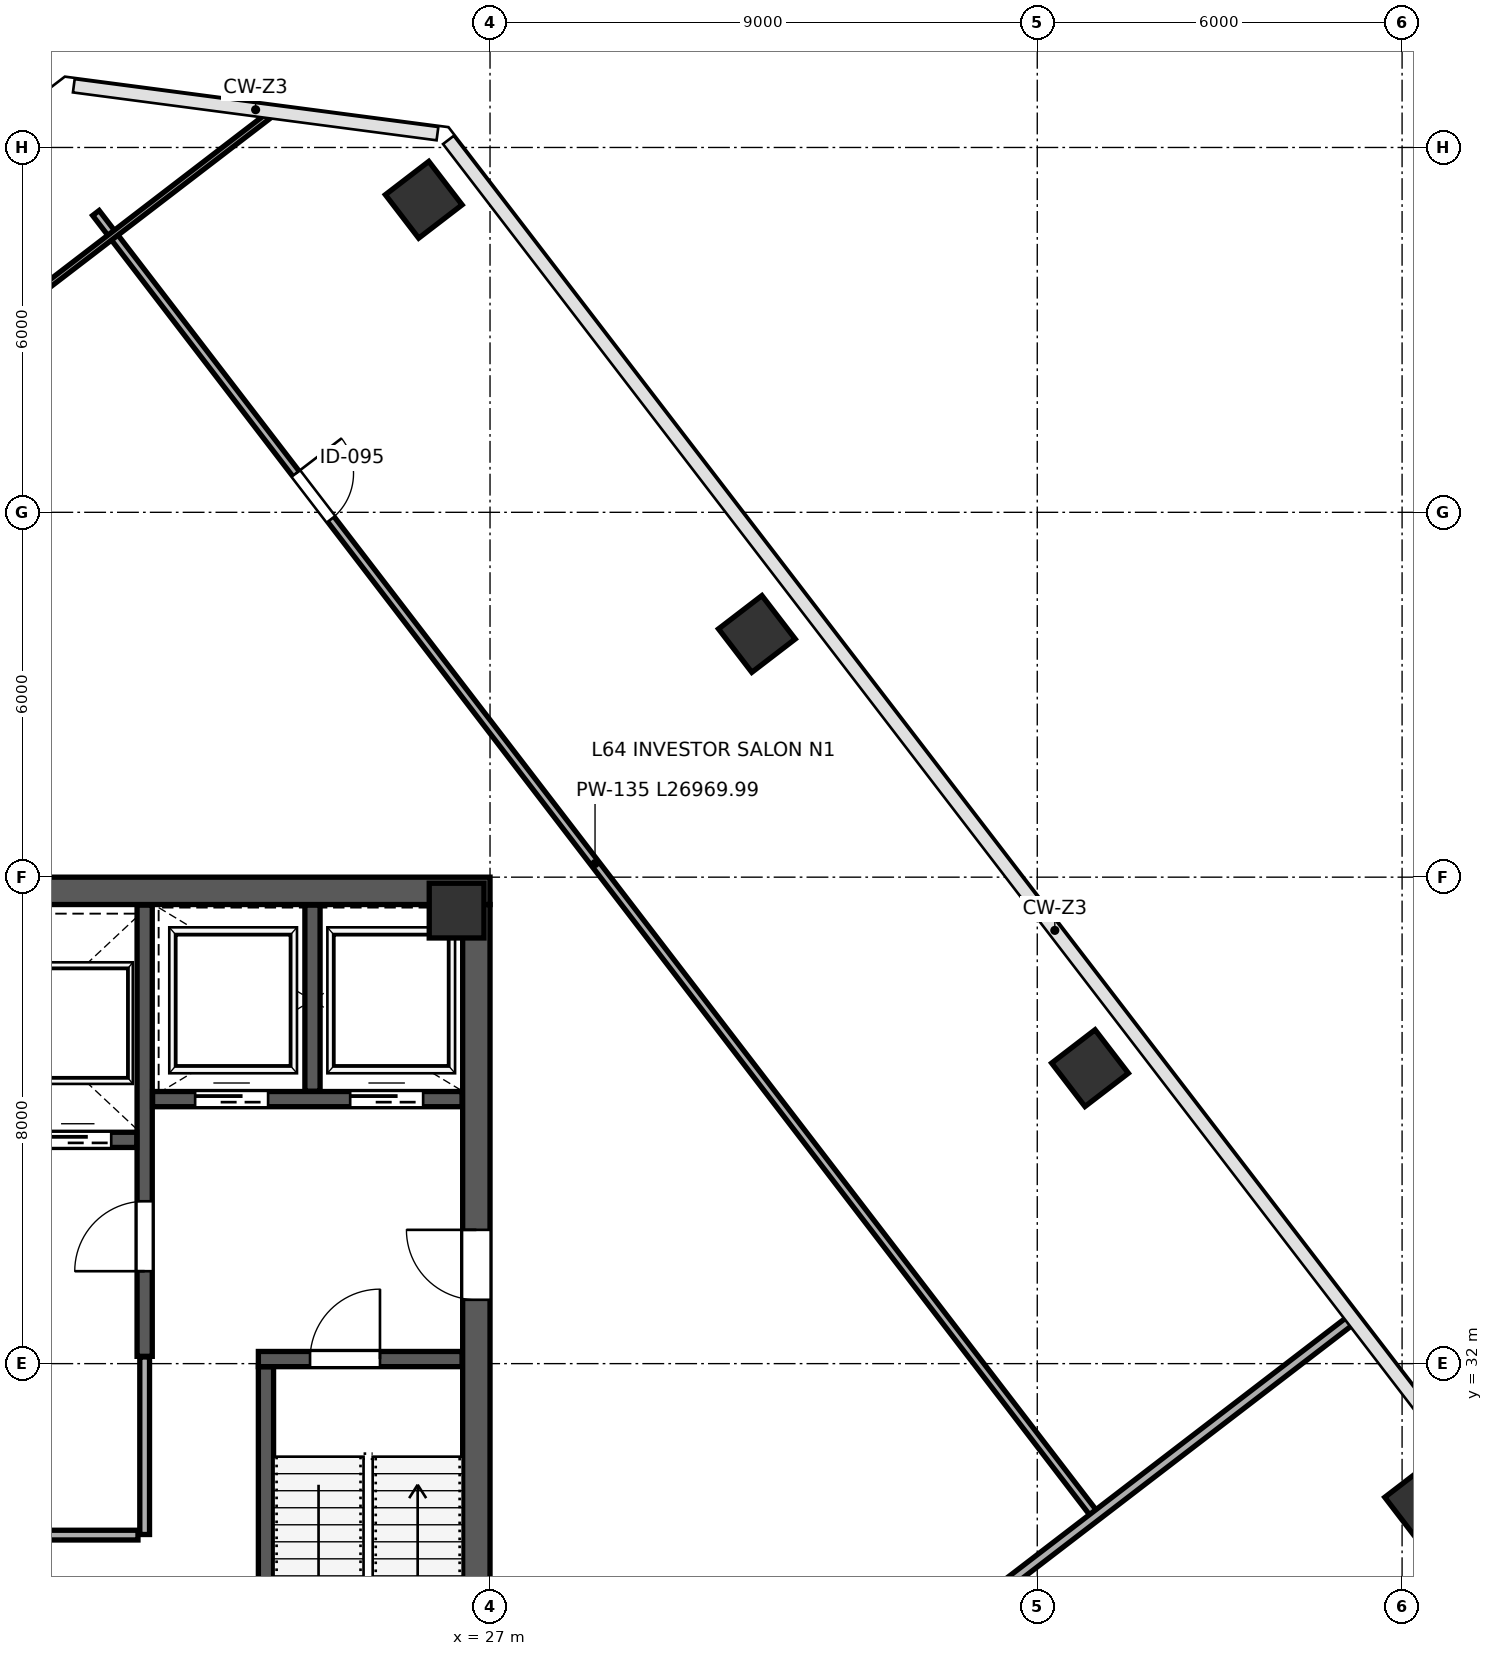
"""IFC4 building model, lengths in metres.
Left out: names, types, materials, properties, quantities, classifications, styles, units other than length and angle.
Written with IfcOpenShell. Run it as: python <this file> out.ifc"""

import sys

from ifc_helpers import new_model, si_unit, direction, frame, frame_2d, origin, origin_2d, place, context, subcontext, project, spatial, rectangle, extrude, source, transform, mapped, element, fill, save


model = new_model("IFC4")
c1 = context("Model", 3, precision=1e-05, world=origin(), true_north=direction((0.0, 1.0)))
c2 = subcontext(c1, "Body", "Model", "MODEL_VIEW")
j1 = project(units=[si_unit("LENGTHUNIT", "METRE"), si_unit("PLANEANGLEUNIT", "RADIAN")], contexts=[c1])
p1 = place(None, origin())
s1 = spatial("IfcSite", under=j1, at=p1, CompositionType="ELEMENT")
p2 = place(p1, origin())
s2 = spatial("IfcBuilding", under=s1, at=p2, CompositionType="ELEMENT")
p3 = place(p2, frame((0.0, 0.0, 283.6)))
s3 = spatial("IfcBuildingStorey", under=s2, at=p3, CompositionType="ELEMENT", Elevation=283.6)
m1 = source(origin(), c2, "Body", "SweptSolid", [
    extrude(rectangle(XDim=0.9, YDim=0.9, at=origin_2d()), origin(), (0.0, 0.0, 1.0), 4.198),
])
p4 = place(p3, frame((26.45, 39.45, 0.001), z_axis=(0.0, 0.0, 1.0), x_axis=(1.0, 0.0, 0.0)))
e1 = element("IfcColumn", 1, at=p4, inside=s3, PredefinedType="COLUMN", context=c2, shape_type="MappedRepresentation", body=[
    mapped(m1, transform((0.0, 0.0, 0.0), scale=1.0)),
])
m2 = source(origin(), c2, "Body", "SweptSolid", [
    extrude(rectangle(XDim=0.9, YDim=0.9, at=origin_2d()), origin(), (0.0, 0.0, 1.0), 4.198),
])
for number, where, z_axis, x_axis in (
    (2, (25.91, 51.14, 0.001), (0.0, 0.0, 1.0), (-0.609, 0.793, 0.0)),
    (3, (31.389, 44.0, 0.001), (0.0, 0.0, 1.0), (-0.609, 0.793, 0.0)),
    (4, (36.867, 36.859, 0.001), (0.0, 0.0, 1.0), (-0.609, 0.793, 0.0)),
    (5, (42.346, 29.719, 0.001), (0.0, 0.0, 1.0), (-0.609, 0.793, 0.0)),
):
    element("IfcColumn", number, at=place(p3, frame(where, z_axis=z_axis, x_axis=x_axis)), inside=s3, PredefinedType="COLUMN", context=c2, shape_type="MappedRepresentation", body=[
        mapped(m2, transform((0.0, 0.0, 0.0), scale=1.0)),
    ])
p5 = place(p3, frame((26.775, 24.45, 0.0), z_axis=(0.0, 0.0, 1.0), x_axis=(0.0, 1.0, 0.0)))
e6 = element("IfcWall", 6, at=p5, inside=s3, PredefinedType="SHEAR", context=c2, shape_type="SweptSolid", body=[
    extrude(rectangle(XDim=15.1, YDim=0.45, at=frame_2d((7.55, 0.0))), origin(), (0.0, 0.0, 1.0), 3.92),
])
p6 = place(p5, frame((8.6, 0.0, 0.0)))
e7 = element("IfcOpeningElement", 7, at=p6, cuts=e6, PredefinedType="OPENING", context=c2, shape_type="SweptSolid", body=[
    extrude(rectangle(XDim=1.15, YDim=2.2, at=frame_2d((0.575, 1.1))), frame((0.0, 0.235, 0.0), z_axis=(0.0, -1.0, 0.0), x_axis=(1.0, 0.0, 0.0)), (0.0, 0.0, 1.0), 0.47),
])
p7 = place(p3, frame((9.0, 39.775, 0.0), z_axis=(0.0, 0.0, 1.0), x_axis=(1.0, 0.0, 0.0)))
e8 = element("IfcWall", 8, at=p7, inside=s3, PredefinedType="SHEAR", context=c2, shape_type="SweptSolid", body=[
    extrude(rectangle(XDim=18.0, YDim=0.45, at=frame_2d((9.0, 0.0))), origin(), (0.0, 0.0, 1.0), 3.92),
])
p8 = place(p3, frame((23.315, 24.46, 0.0), z_axis=(0.0, 0.0, 1.0), x_axis=(0.0, 1.0, 0.0)))
e9 = element("IfcWall", 9, at=p8, inside=s3, PredefinedType="SHEAR", context=c2, shape_type="SweptSolid", body=[
    extrude(rectangle(XDim=7.49, YDim=0.25, at=frame_2d((3.745, 0.0))), origin(), (0.0, 0.0, 1.0), 3.92),
])
p9 = place(p3, frame((23.19, 32.075, 0.0), z_axis=(0.0, 0.0, 1.0), x_axis=(1.0, 0.0, 0.0)))
e10 = element("IfcWall", 10, at=p9, inside=s3, PredefinedType="SHEAR", context=c2, shape_type="SweptSolid", body=[
    extrude(rectangle(XDim=3.35, YDim=0.25, at=frame_2d((1.675, 0.0))), origin(), (0.0, 0.0, 1.0), 3.92),
])
p10 = place(p9, frame((0.85, 0.0, 0.0)))
e11 = element("IfcOpeningElement", 11, at=p10, cuts=e10, PredefinedType="OPENING", context=c2, shape_type="SweptSolid", body=[
    extrude(rectangle(XDim=1.15, YDim=2.2, at=frame_2d((0.575, 1.1))), frame((0.0, 0.135, 0.0), z_axis=(0.0, -1.0, 0.0), x_axis=(1.0, 0.0, 0.0)), (0.0, 0.0, 1.0), 0.27),
])
p11 = place(p3, frame((21.32, 32.12, 0.0), z_axis=(0.0, 0.0, 1.0), x_axis=(0.0, 1.0, 0.0)))
e12 = element("IfcWall", 12, at=p11, inside=s3, PredefinedType="SHEAR", context=c2, shape_type="SweptSolid", body=[
    extrude(rectangle(XDim=7.42, YDim=0.25, at=frame_2d((3.71, 0.0))), origin(), (0.0, 0.0, 1.0), 3.92),
])
p12 = place(p11, frame((1.4, 0.0, 0.0)))
e13 = element("IfcOpeningElement", 13, at=p12, cuts=e12, PredefinedType="OPENING", context=c2, shape_type="SweptSolid", body=[
    extrude(rectangle(XDim=1.15, YDim=2.2, at=frame_2d((0.575, 1.1))), frame((0.0, 0.135, 0.0), z_axis=(0.0, -1.0, 0.0), x_axis=(1.0, 0.0, 0.0)), (0.0, 0.0, 1.0), 0.27),
])
p13 = place(p3, frame((21.45, 36.35, 0.0), z_axis=(0.0, 0.0, 1.0), x_axis=(1.0, 0.0, 0.0)))
e14 = element("IfcWall", 14, at=p13, inside=s3, PredefinedType="SHEAR", context=c2, shape_type="SweptSolid", body=[
    extrude(rectangle(XDim=5.09, YDim=0.25, at=frame_2d((2.545, 0.0))), origin(), (0.0, 0.0, 1.0), 3.92),
])
p14 = place(p13, frame((0.7, 0.0, 0.0)))
e15 = element("IfcOpeningElement", 15, at=p14, cuts=e14, PredefinedType="OPENING", context=c2, shape_type="SweptSolid", body=[
    extrude(rectangle(XDim=1.2, YDim=2.2, at=frame_2d((0.6, 1.1))), frame((0.0, 0.135, 0.0), z_axis=(0.0, -1.0, 0.0), x_axis=(1.0, 0.0, 0.0)), (0.0, 0.0, 1.0), 0.27),
])
p15 = place(p13, frame((3.25, 0.0, 0.0)))
e16 = element("IfcOpeningElement", 16, at=p15, cuts=e14, PredefinedType="OPENING", context=c2, shape_type="SweptSolid", body=[
    extrude(rectangle(XDim=1.2, YDim=2.2, at=frame_2d((0.6, 1.1))), frame((0.0, 0.135, 0.0), z_axis=(0.0, -1.0, 0.0), x_axis=(1.0, 0.0, 0.0)), (0.0, 0.0, 1.0), 0.27),
])
p16 = place(p3, frame((24.08, 36.48, 0.0), z_axis=(0.0, 0.0, 1.0), x_axis=(0.0, 1.0, 0.0)))
e17 = element("IfcWall", 17, at=p16, inside=s3, PredefinedType="SHEAR", context=c2, shape_type="SweptSolid", body=[
    extrude(rectangle(XDim=3.06, YDim=0.25, at=frame_2d((1.53, 0.0))), origin(), (0.0, 0.0, 1.0), 3.92),
])
p17 = place(p3, frame((17.32, 35.68, 0.0), z_axis=(0.0, 0.0, 1.0), x_axis=(1.0, 0.0, 0.0)))
e18 = element("IfcWall", 18, at=p17, inside=s3, PredefinedType="SHEAR", context=c2, shape_type="SweptSolid", body=[
    extrude(rectangle(XDim=3.87, YDim=0.25, at=frame_2d((1.935, 0.0))), origin(), (0.0, 0.0, 1.0), 3.92),
])
p18 = place(p17, frame((0.45, 0.0, 0.0)))
e19 = element("IfcOpeningElement", 19, at=p18, cuts=e18, PredefinedType="OPENING", context=c2, shape_type="SweptSolid", body=[
    extrude(rectangle(XDim=1.1, YDim=2.2, at=frame_2d((0.55, 1.1))), frame((0.0, 0.135, 0.0), z_axis=(0.0, -1.0, 0.0), x_axis=(1.0, 0.0, 0.0)), (0.0, 0.0, 1.0), 0.27),
])
p19 = place(p17, frame((2.35, 0.0, 0.0)))
e20 = element("IfcOpeningElement", 20, at=p19, cuts=e18, PredefinedType="OPENING", context=c2, shape_type="SweptSolid", body=[
    extrude(rectangle(XDim=1.1, YDim=2.2, at=frame_2d((0.55, 1.1))), frame((0.0, 0.135, 0.0), z_axis=(0.0, -1.0, 0.0), x_axis=(1.0, 0.0, 0.0)), (0.0, 0.0, 1.0), 0.27),
])
p20 = place(p3, frame((12.84, 29.18, 0.0), z_axis=(0.0, 0.0, 1.0), x_axis=(1.0, 0.0, 0.0)))
e21 = element("IfcWall", 21, at=p20, inside=s3, PredefinedType="PARTITIONING", context=c2, shape_type="SweptSolid", body=[
    extrude(rectangle(XDim=8.37, YDim=0.16, at=frame_2d((4.185, 0.0))), origin(), (0.0, 0.0, 1.0), 3.92),
])
p21 = place(p20, frame((2.6, 0.0, 0.0)))
e22 = element("IfcOpeningElement", 22, at=p21, cuts=e21, PredefinedType="OPENING", context=c2, shape_type="SweptSolid", body=[
    extrude(rectangle(XDim=0.9, YDim=2.15, at=frame_2d((0.45, 1.075))), frame((0.0, 0.09, 0.0), z_axis=(0.0, -1.0, 0.0), x_axis=(1.0, 0.0, 0.0)), (0.0, 0.0, 1.0), 0.18),
])
p22 = place(p3, frame((21.32, 29.19, 0.0), z_axis=(0.0, 0.0, 1.0), x_axis=(0.0, 1.0, 0.0)))
e23 = element("IfcWall", 23, at=p22, inside=s3, PredefinedType="PARTITIONING", context=c2, shape_type="SweptSolid", body=[
    extrude(rectangle(XDim=2.92, YDim=0.16, at=frame_2d((1.46, 0.0))), origin(), (0.0, 0.0, 1.0), 3.92),
])
p23 = place(p3, frame((20.518, 50.922, 0.0), z_axis=(0.0, 0.0, 1.0), x_axis=(0.608759693778, -0.793354671778, 0.0)))
e24 = element("IfcWall", 24, at=p23, inside=s3, PredefinedType="PARTITIONING", context=c2, shape_type="SweptSolid", body=[
    extrude(rectangle(XDim=26.97, YDim=0.135, at=frame_2d((13.485, 0.0))), origin(), (0.0, 0.0, 1.0), 3.92),
])
p24 = place(p23, frame((5.4, 0.0, 0.0)))
e25 = element("IfcOpeningElement", 25, at=p24, cuts=e24, PredefinedType="OPENING", context=c2, shape_type="SweptSolid", body=[
    extrude(rectangle(XDim=0.95, YDim=2.15, at=frame_2d((0.475, 1.075))), frame((0.0, 0.078, 0.0), z_axis=(0.0, -1.0, 0.0), x_axis=(1.0, 0.0, 0.0)), (0.0, 0.0, 1.0), 0.155),
])
p25 = place(p3, frame((1.519, 35.764, 0.0), z_axis=(0.0, 0.0, 1.0), x_axis=(0.793353184068, 0.608761632602, 0.0)))
e26 = element("IfcWall", 26, at=p25, inside=s3, PredefinedType="PARTITIONING", context=c2, shape_type="SweptSolid", body=[
    extrude(rectangle(XDim=27.572, YDim=0.1, at=frame_2d((13.786, 0.0))), origin(), (0.0, 0.0, 1.0), 3.92),
])
p26 = place(p3, frame((25.092, 20.387, 0.0), z_axis=(0.0, 0.0, 1.0), x_axis=(0.793357014217, 0.608756641025, 0.0)))
e27 = element("IfcWall", 27, at=p26, inside=s3, PredefinedType="PARTITIONING", context=c2, shape_type="SweptSolid", body=[
    extrude(rectangle(XDim=20.24, YDim=0.16, at=frame_2d((10.12, 0.0))), origin(), (0.0, 0.0, 1.0), 3.155),
])
m3 = source(origin(), c2, "Body", "SweptSolid", [
    extrude(rectangle(XDim=1.15, YDim=2.2, at=frame_2d((0.575, 1.1))), frame((0.0, 0.025, 0.0), z_axis=(0.0, -1.0, 0.0), x_axis=(1.0, 0.0, 0.0)), (0.0, 0.0, 1.0), 0.05),
])
p27 = place(p12, origin())
e28 = element("IfcDoor", 28, at=p27, inside=s3, OperationType="SINGLE_SWING_LEFT", PredefinedType="DOOR", context=c2, shape_type="MappedRepresentation", body=[
    mapped(m3, transform((0.0, 0.0, 0.0), scale=1.0)),
])
fill(e13, e28)
m4 = source(origin(), c2, "Body", "SweptSolid", [
    extrude(rectangle(XDim=1.15, YDim=2.2, at=frame_2d((0.575, 1.1))), frame((0.0, 0.025, 0.0), z_axis=(0.0, -1.0, 0.0), x_axis=(1.0, 0.0, 0.0)), (0.0, 0.0, 1.0), 0.05),
])
p28 = place(p10, origin())
e29 = element("IfcDoor", 29, at=p28, inside=s3, OperationType="SINGLE_SWING_RIGHT", PredefinedType="DOOR", context=c2, shape_type="MappedRepresentation", body=[
    mapped(m4, transform((0.0, 0.0, 0.0), scale=1.0)),
])
fill(e11, e29)
p29 = place(p6, origin())
e30 = element("IfcDoor", 30, at=p29, inside=s3, OperationType="SINGLE_SWING_RIGHT", PredefinedType="DOOR", context=c2, shape_type="MappedRepresentation", body=[
    mapped(m3, transform((0.0, 0.0, 0.0), scale=1.0)),
])
fill(e7, e30)
m5 = source(origin(), c2, "Body", "SweptSolid", [
    extrude(rectangle(XDim=1.1, YDim=2.2, at=frame_2d((0.55, 1.1))), frame((0.0, 0.025, 0.0), z_axis=(0.0, -1.0, 0.0), x_axis=(1.0, 0.0, 0.0)), (0.0, 0.0, 1.0), 0.05),
])
p30 = place(p19, origin())
e31 = element("IfcDoor", 31, at=p30, inside=s3, OperationType="SLIDING_TO_RIGHT", PredefinedType="DOOR", context=c2, shape_type="MappedRepresentation", body=[
    mapped(m5, transform((0.0, 0.0, 0.0), scale=1.0)),
])
fill(e20, e31)
m6 = source(origin(), c2, "Body", "SweptSolid", [
    extrude(rectangle(XDim=1.2, YDim=2.2, at=frame_2d((0.6, 1.1))), frame((0.0, 0.025, 0.0), z_axis=(0.0, -1.0, 0.0), x_axis=(1.0, 0.0, 0.0)), (0.0, 0.0, 1.0), 0.05),
])
p31 = place(p14, origin())
e32 = element("IfcDoor", 32, at=p31, inside=s3, OperationType="SLIDING_TO_LEFT", PredefinedType="DOOR", context=c2, shape_type="MappedRepresentation", body=[
    mapped(m6, transform((0.0, 0.0, 0.0), scale=1.0)),
])
fill(e15, e32)
p32 = place(p15, origin())
e33 = element("IfcDoor", 33, at=p32, inside=s3, OperationType="SLIDING_TO_RIGHT", PredefinedType="DOOR", context=c2, shape_type="MappedRepresentation", body=[
    mapped(m6, transform((0.0, 0.0, 0.0), scale=1.0)),
])
fill(e16, e33)
m7 = source(origin(), c2, "Body", "SweptSolid", [
    extrude(rectangle(XDim=0.95, YDim=2.15, at=frame_2d((0.475, 1.075))), frame((0.0, 0.025, 0.0), z_axis=(0.0, -1.0, 0.0), x_axis=(1.0, 0.0, 0.0)), (0.0, 0.0, 1.0), 0.05),
])
p33 = place(p24, origin())
e34 = element("IfcDoor", 34, at=p33, inside=s3, OperationType="SINGLE_SWING_LEFT", PredefinedType="DOOR", context=c2, shape_type="MappedRepresentation", body=[
    mapped(m7, transform((0.0, 0.0, 0.0), scale=1.0)),
])
fill(e25, e34)
save(model, sys.argv[1])
